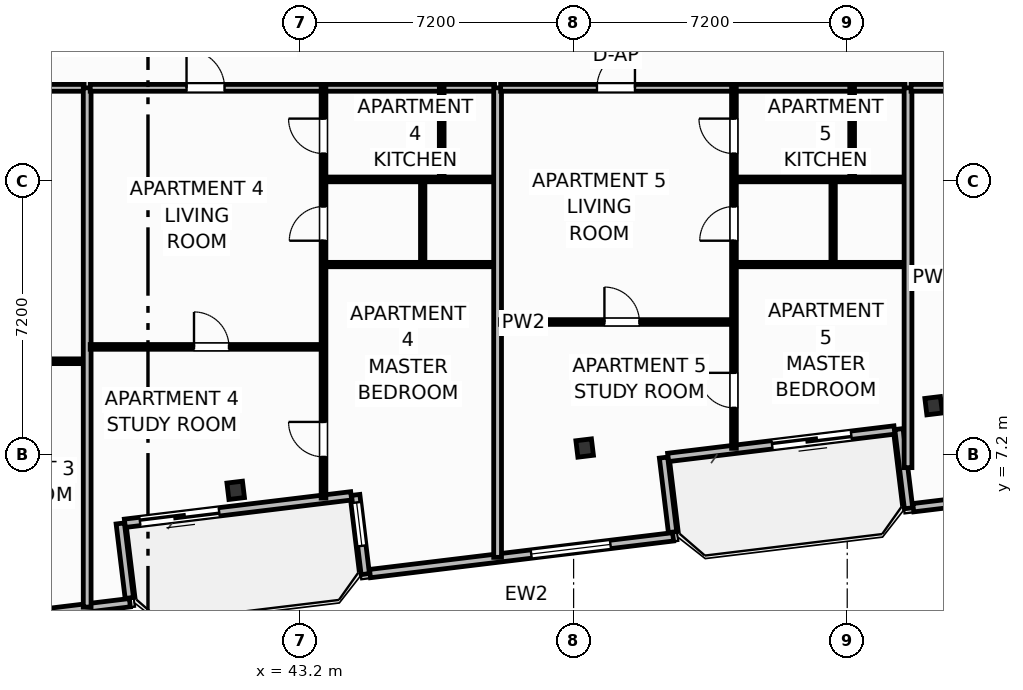
"""IFC4 building model, lengths in metres.
Left out: names, types, materials, properties, quantities, classifications, styles, units other than length and angle.
Written with IfcOpenShell. Run it as: python <this file> out.ifc"""

import sys

from ifc_helpers import new_model, si_unit, direction, frame, frame_2d, origin, origin_2d, place, context, subcontext, project, spatial, rectangle, i_section, extrude, element, fill, save


model = new_model("IFC4")
c1 = context("Model", 3, precision=1e-05, world=origin(), true_north=direction((0.0, 1.0)))
c2 = subcontext(c1, "Body", "Model", "MODEL_VIEW")
j1 = project(units=[si_unit("LENGTHUNIT", "METRE"), si_unit("PLANEANGLEUNIT", "RADIAN")], contexts=[c1])
p1 = place(None, origin())
s1 = spatial("IfcSite", under=j1, at=p1, CompositionType="ELEMENT")
p2 = place(p1, origin())
s2 = spatial("IfcBuilding", under=s1, at=p2, CompositionType="ELEMENT")
p3 = place(p2, frame((0.0, 0.0, 174.6)))
s3 = spatial("IfcBuildingStorey", under=s2, at=p3, CompositionType="ELEMENT", Elevation=174.6)
for number, where, z_axis, x_axis in (
    (1, (41.508, 6.26, 0.0), (0.0, 0.0, 1.0), (0.993, 0.12, 0.0)),
    (2, (50.691, 7.373, 0.0), (0.0, 0.0, 1.0), (0.993, 0.12, 0.0)),
    (3, (59.874, 8.486, 0.0), (0.0, 0.0, 1.0), (0.993, 0.12, 0.0)),
):
    element("IfcColumn", number, at=place(p3, frame(where, z_axis=z_axis, x_axis=x_axis)), inside=s3, PredefinedType="COLUMN", context=c2, shape_type="SweptSolid", body=[
        extrude(i_section(OverallWidth=0.412, OverallDepth=0.435, WebThickness=0.036, FlangeThickness=0.057, FilletRadius=0.025, at=origin_2d()), origin(), (0.0, 0.0, 1.0), 3.7),
    ])
p4 = place(p3, frame((44.548, 6.114, 0.0), z_axis=(0.0, 0.0, 1.0), x_axis=(-0.992735402148, -0.120318000826, 0.0)))
e4 = element("IfcWall", 4, at=p4, inside=s3, PredefinedType="SOLIDWALL", context=c2, shape_type="SweptSolid", body=[
    extrude(rectangle(XDim=6.0, YDim=0.22, at=frame_2d((3.0, 0.0))), origin(), (0.0, 0.0, 1.0), 2.73),
])
p5 = place(p4, frame((3.5, 0.0, 0.0)))
e5 = element("IfcOpeningElement", 5, at=p5, cuts=e4, PredefinedType="OPENING", context=c2, shape_type="SweptSolid", body=[
    extrude(rectangle(XDim=2.1, YDim=2.3, at=frame_2d((1.05, 1.15))), frame((0.0, 0.12, 0.0), z_axis=(0.0, -1.0, 0.0), x_axis=(1.0, 0.0, 0.0)), (0.0, 0.0, 1.0), 0.24),
])
p6 = place(p3, frame((58.843, 7.847, 0.0), z_axis=(0.0, 0.0, 1.0), x_axis=(-0.992729951822, -0.120362962556, 0.0)))
e6 = element("IfcWall", 6, at=p6, inside=s3, PredefinedType="SOLIDWALL", context=c2, shape_type="SweptSolid", body=[
    extrude(rectangle(XDim=6.0, YDim=0.22, at=frame_2d((3.0, 0.0))), origin(), (0.0, 0.0, 1.0), 2.73),
])
p7 = place(p6, frame((1.144, 0.0, 0.0)))
e7 = element("IfcOpeningElement", 7, at=p7, cuts=e6, PredefinedType="OPENING", context=c2, shape_type="SweptSolid", body=[
    extrude(rectangle(XDim=2.1, YDim=2.3, at=frame_2d((1.05, 1.15))), frame((0.0, 0.12, 0.0), z_axis=(0.0, -1.0, 0.0), x_axis=(1.0, 0.0, 0.0)), (0.0, 0.0, 1.0), 0.24),
])
p8 = place(p3, frame((30.747, 2.336, 0.0), z_axis=(0.0, 0.0, 1.0), x_axis=(0.992731032022, 0.120354052946, 0.0)))
e8 = element("IfcWall", 8, at=p8, inside=s3, PredefinedType="SOLIDWALL", context=c2, shape_type="SweptSolid", body=[
    extrude(rectangle(XDim=8.035, YDim=0.22, at=frame_2d((4.018, 0.0))), origin(), (0.0, 0.0, 1.0), 2.73),
])
p9 = place(p8, frame((2.968, 0.0, 0.8)))
e9 = element("IfcOpeningElement", 9, at=p9, cuts=e8, PredefinedType="OPENING", context=c2, shape_type="SweptSolid", body=[
    extrude(rectangle(XDim=2.1, YDim=1.75, at=frame_2d((1.05, 0.875))), frame((0.0, 0.12, 0.0), z_axis=(0.0, -1.0, 0.0), x_axis=(1.0, 0.0, 0.0)), (0.0, 0.0, 1.0), 0.24),
])
p10 = place(p3, frame((38.709, 3.427, 0.0), z_axis=(0.0, 0.0, 1.0), x_axis=(-0.120397815541, 0.992725725472, 0.0)))
e10 = element("IfcWall", 10, at=p10, inside=s3, PredefinedType="SOLIDWALL", context=c2, shape_type="SweptSolid", body=[
    extrude(rectangle(XDim=1.975, YDim=0.22, at=frame_2d((0.988, 0.0))), origin(), (0.0, 0.0, 1.0), 2.73),
])
p11 = place(p3, frame((44.666, 6.138, 0.0), z_axis=(0.0, 0.0, 1.0), x_axis=(0.120327895535, -0.992734202874, 0.0)))
e11 = element("IfcWall", 11, at=p11, inside=s3, PredefinedType="SOLIDWALL", context=c2, shape_type="SweptSolid", body=[
    extrude(rectangle(XDim=2.1, YDim=0.22, at=frame_2d((1.05, 0.0))), origin(), (0.0, 0.0, 1.0), 2.73),
])
p12 = place(p11, frame((0.2, 0.0, 0.8)))
e12 = element("IfcOpeningElement", 12, at=p12, cuts=e11, PredefinedType="OPENING", context=c2, shape_type="SweptSolid", body=[
    extrude(rectangle(XDim=1.15, YDim=1.4, at=frame_2d((0.575, 0.7))), frame((0.0, 0.12, 0.0), z_axis=(0.0, -1.0, 0.0), x_axis=(1.0, 0.0, 0.0)), (0.0, 0.0, 1.0), 0.24),
])
p13 = place(p3, frame((45.042, 4.069, 0.0), z_axis=(0.0, 0.0, 1.0), x_axis=(0.992731032022, 0.120354052946, 0.0)))
e13 = element("IfcWall", 13, at=p13, inside=s3, PredefinedType="SOLIDWALL", context=c2, shape_type="SweptSolid", body=[
    extrude(rectangle(XDim=8.035, YDim=0.22, at=frame_2d((4.018, 0.0))), origin(), (0.0, 0.0, 1.0), 2.73),
])
p14 = place(p13, frame((4.273, 0.0, 0.8)))
e14 = element("IfcOpeningElement", 14, at=p14, cuts=e13, PredefinedType="OPENING", context=c2, shape_type="SweptSolid", body=[
    extrude(rectangle(XDim=2.1, YDim=1.75, at=frame_2d((1.05, 0.875))), frame((0.0, 0.12, 0.0), z_axis=(0.0, -1.0, 0.0), x_axis=(1.0, 0.0, 0.0)), (0.0, 0.0, 1.0), 0.24),
])
p15 = place(p3, frame((53.004, 5.16, 0.0), z_axis=(0.0, 0.0, 1.0), x_axis=(-0.120397815541, 0.992725725472, 0.0)))
e15 = element("IfcWall", 15, at=p15, inside=s3, PredefinedType="SOLIDWALL", context=c2, shape_type="SweptSolid", body=[
    extrude(rectangle(XDim=1.975, YDim=0.22, at=frame_2d((0.988, 0.0))), origin(), (0.0, 0.0, 1.0), 2.73),
])
p16 = place(p3, frame((58.961, 7.872, 0.0), z_axis=(0.0, 0.0, 1.0), x_axis=(0.120327895535, -0.992734202874, 0.0)))
e16 = element("IfcWall", 16, at=p16, inside=s3, PredefinedType="SOLIDWALL", context=c2, shape_type="SweptSolid", body=[
    extrude(rectangle(XDim=2.1, YDim=0.22, at=frame_2d((1.05, 0.0))), origin(), (0.0, 0.0, 1.0), 2.73),
])
p17 = place(p3, frame((59.338, 5.802, 0.0), z_axis=(0.0, 0.0, 1.0), x_axis=(0.992731225757, 0.120352454927, 0.0)))
e17 = element("IfcWall", 17, at=p17, inside=s3, PredefinedType="SOLIDWALL", context=c2, shape_type="SweptSolid", body=[
    extrude(rectangle(XDim=12.447, YDim=0.22, at=frame_2d((6.224, 0.0))), origin(), (0.0, 0.0, 1.0), 2.73),
])
p18 = place(p17, frame((5.174, 0.0, 0.8)))
e18 = element("IfcOpeningElement", 18, at=p18, cuts=e17, PredefinedType="OPENING", context=c2, shape_type="SweptSolid", body=[
    extrude(rectangle(XDim=2.1, YDim=1.75, at=frame_2d((1.05, 0.875))), frame((0.0, 0.12, 0.0), z_axis=(0.0, -1.0, 0.0), x_axis=(1.0, 0.0, 0.0)), (0.0, 0.0, 1.0), 0.24),
])
p19 = place(p3, frame((31.451, 9.656, 0.0), z_axis=(0.0, 0.0, 1.0), x_axis=(1.0, 0.0, 0.0)))
e19 = element("IfcWall", 19, at=p19, inside=s3, PredefinedType="PARTITIONING", context=c2, shape_type="SweptSolid", body=[
    extrude(rectangle(XDim=6.069, YDim=0.125, at=frame_2d((3.035, 0.0))), origin(), (0.0, 0.0, 1.0), 3.45),
])
p20 = place(p19, frame((2.731, 0.0, 0.0)))
e20 = element("IfcOpeningElement", 20, at=p20, cuts=e19, PredefinedType="OPENING", context=c2, shape_type="SweptSolid", body=[
    extrude(rectangle(XDim=0.92, YDim=2.05, at=frame_2d((0.46, 1.025))), frame((0.0, 0.073, 0.0), z_axis=(0.0, -1.0, 0.0), x_axis=(1.0, 0.0, 0.0)), (0.0, 0.0, 1.0), 0.145),
])
p21 = place(p3, frame((26.88, 16.85, 0.0), z_axis=(0.0, 0.0, 1.0), x_axis=(1.0, 0.0, 0.0)))
e21 = element("IfcWall", 21, at=p21, inside=s3, PredefinedType="PARTITIONING", context=c2, shape_type="SweptSolid", body=[
    extrude(rectangle(XDim=10.64, YDim=0.18, at=frame_2d((5.32, 0.0))), origin(), (0.0, 0.0, 1.0), 3.45),
])
p22 = place(p21, frame((7.105, 0.0, 0.0)))
e22 = element("IfcOpeningElement", 22, at=p22, cuts=e21, PredefinedType="OPENING", context=c2, shape_type="SweptSolid", body=[
    extrude(rectangle(XDim=1.0, YDim=2.2, at=frame_2d((0.5, 1.1))), frame((0.0, 0.1, 0.0), z_axis=(0.0, -1.0, 0.0), x_axis=(1.0, 0.0, 0.0)), (0.0, 0.0, 1.0), 0.2),
])
p23 = place(p3, frame((37.6, 3.187, 0.0), z_axis=(0.0, 0.0, 1.0), x_axis=(0.0, 1.0, 0.0)))
e23 = element("IfcWall", 23, at=p23, inside=s3, PredefinedType="PARTITIONING", context=c2, shape_type="SweptSolid", body=[
    extrude(rectangle(XDim=13.663, YDim=0.205, at=frame_2d((6.832, 0.0))), origin(), (0.0, 0.0, 1.0), 3.45),
])
p24 = place(p3, frame((37.68, 10.033, 0.0), z_axis=(0.0, 0.0, 1.0), x_axis=(1.0, 0.0, 0.0)))
e24 = element("IfcWall", 24, at=p24, inside=s3, PredefinedType="PARTITIONING", context=c2, shape_type="SweptSolid", body=[
    extrude(rectangle(XDim=6.069, YDim=0.125, at=frame_2d((3.035, 0.0))), origin(), (0.0, 0.0, 1.0), 3.45),
])
p25 = place(p24, frame((2.731, 0.0, 0.0)))
e25 = element("IfcOpeningElement", 25, at=p25, cuts=e24, PredefinedType="OPENING", context=c2, shape_type="SweptSolid", body=[
    extrude(rectangle(XDim=0.92, YDim=2.05, at=frame_2d((0.46, 1.025))), frame((0.0, 0.073, 0.0), z_axis=(0.0, -1.0, 0.0), x_axis=(1.0, 0.0, 0.0)), (0.0, 0.0, 1.0), 0.145),
])
p26 = place(p3, frame((37.68, 16.85, 0.0), z_axis=(0.0, 0.0, 1.0), x_axis=(1.0, 0.0, 0.0)))
e26 = element("IfcWall", 26, at=p26, inside=s3, PredefinedType="PARTITIONING", context=c2, shape_type="SweptSolid", body=[
    extrude(rectangle(XDim=10.64, YDim=0.18, at=frame_2d((5.32, 0.0))), origin(), (0.0, 0.0, 1.0), 3.45),
])
p27 = place(p26, frame((2.535, 0.0, 0.0)))
e27 = element("IfcOpeningElement", 27, at=p27, cuts=e26, PredefinedType="OPENING", context=c2, shape_type="SweptSolid", body=[
    extrude(rectangle(XDim=1.0, YDim=2.2, at=frame_2d((0.5, 1.1))), frame((0.0, 0.1, 0.0), z_axis=(0.0, -1.0, 0.0), x_axis=(1.0, 0.0, 0.0)), (0.0, 0.0, 1.0), 0.2),
])
p28 = place(p3, frame((43.819, 6.056, 0.0), z_axis=(0.0, 0.0, 1.0), x_axis=(0.0, 1.0, 0.0)))
e28 = element("IfcWall", 28, at=p28, inside=s3, PredefinedType="PARTITIONING", context=c2, shape_type="SweptSolid", body=[
    extrude(rectangle(XDim=10.794, YDim=0.125, at=frame_2d((5.397, 0.0))), origin(), (0.0, 0.0, 1.0), 2.662),
])
p29 = place(p28, frame((1.083, 0.0, 0.0)))
e29 = element("IfcOpeningElement", 29, at=p29, cuts=e28, PredefinedType="OPENING", context=c2, shape_type="SweptSolid", body=[
    extrude(rectangle(XDim=0.92, YDim=2.05, at=frame_2d((0.46, 1.025))), frame((0.0, 0.073, 0.0), z_axis=(0.0, -1.0, 0.0), x_axis=(1.0, 0.0, 0.0)), (0.0, 0.0, 1.0), 0.145),
])
p30 = place(p28, frame((6.771, 0.0, 0.0)))
e30 = element("IfcOpeningElement", 30, at=p30, cuts=e28, PredefinedType="OPENING", context=c2, shape_type="SweptSolid", body=[
    extrude(rectangle(XDim=0.9, YDim=2.05, at=frame_2d((0.45, 1.025))), frame((0.0, 0.073, 0.0), z_axis=(0.0, -1.0, 0.0), x_axis=(1.0, 0.0, 0.0)), (0.0, 0.0, 1.0), 0.145),
])
p31 = place(p28, frame((9.064, 0.0, 0.0)))
e31 = element("IfcOpeningElement", 31, at=p31, cuts=e28, PredefinedType="OPENING", context=c2, shape_type="SweptSolid", body=[
    extrude(rectangle(XDim=0.92, YDim=2.05, at=frame_2d((0.46, 1.025))), frame((0.0, 0.073, 0.0), z_axis=(0.0, -1.0, 0.0), x_axis=(1.0, 0.0, 0.0)), (0.0, 0.0, 1.0), 0.145),
])
p32 = place(p3, frame((43.889, 14.44, 0.0), z_axis=(0.0, 0.0, 1.0), x_axis=(1.0, 0.0, 0.0)))
e32 = element("IfcWall", 32, at=p32, inside=s3, PredefinedType="PARTITIONING", context=c2, shape_type="SweptSolid", body=[
    extrude(rectangle(XDim=4.431, YDim=0.125, at=frame_2d((2.215, 0.0))), origin(), (0.0, 0.0, 1.0), 3.45),
])
p33 = place(p3, frame((43.889, 12.2, 0.0), z_axis=(0.0, 0.0, 1.0), x_axis=(1.0, 0.0, 0.0)))
e33 = element("IfcWall", 33, at=p33, inside=s3, PredefinedType="PARTITIONING", context=c2, shape_type="SweptSolid", body=[
    extrude(rectangle(XDim=4.431, YDim=0.115, at=frame_2d((2.215, 0.0))), origin(), (0.0, 0.0, 1.0), 3.45),
])
p34 = place(p3, frame((46.929, 14.44, 0.0), z_axis=(0.0, 0.0, 1.0), x_axis=(0.0, 1.0, 0.0)))
e34 = element("IfcWall", 34, at=p34, inside=s3, PredefinedType="PARTITIONING", context=c2, shape_type="SweptSolid", body=[
    extrude(rectangle(XDim=2.41, YDim=0.125, at=frame_2d((1.205, 0.0))), origin(), (0.0, 0.0, 1.0), 3.45),
])
p35 = place(p3, frame((46.429, 12.2, 0.0), z_axis=(0.0, 0.0, 1.0), x_axis=(0.0, 1.0, 0.0)))
e35 = element("IfcWall", 35, at=p35, inside=s3, PredefinedType="PARTITIONING", context=c2, shape_type="SweptSolid", body=[
    extrude(rectangle(XDim=2.24, YDim=0.115, at=frame_2d((1.12, 0.0))), origin(), (0.0, 0.0, 1.0), 3.45),
])
p36 = place(p3, frame((48.4, 4.496, 0.0), z_axis=(0.0, 0.0, 1.0), x_axis=(0.0, 1.0, 0.0)))
e36 = element("IfcWall", 36, at=p36, inside=s3, PredefinedType="PARTITIONING", context=c2, shape_type="SweptSolid", body=[
    extrude(rectangle(XDim=12.354, YDim=0.205, at=frame_2d((6.177, 0.0))), origin(), (0.0, 0.0, 1.0), 3.45),
])
p37 = place(p3, frame((48.48, 10.688, 0.0), z_axis=(0.0, 0.0, 1.0), x_axis=(1.0, 0.0, 0.0)))
e37 = element("IfcWall", 37, at=p37, inside=s3, PredefinedType="PARTITIONING", context=c2, shape_type="SweptSolid", body=[
    extrude(rectangle(XDim=6.069, YDim=0.125, at=frame_2d((3.035, 0.0))), origin(), (0.0, 0.0, 1.0), 3.45),
])
p38 = place(p37, frame((2.731, 0.0, 0.0)))
e38 = element("IfcOpeningElement", 38, at=p38, cuts=e37, PredefinedType="OPENING", context=c2, shape_type="SweptSolid", body=[
    extrude(rectangle(XDim=0.92, YDim=2.05, at=frame_2d((0.46, 1.025))), frame((0.0, 0.073, 0.0), z_axis=(0.0, -1.0, 0.0), x_axis=(1.0, 0.0, 0.0)), (0.0, 0.0, 1.0), 0.145),
])
p39 = place(p3, frame((48.48, 16.85, 0.0), z_axis=(0.0, 0.0, 1.0), x_axis=(1.0, 0.0, 0.0)))
e39 = element("IfcWall", 39, at=p39, inside=s3, PredefinedType="PARTITIONING", context=c2, shape_type="SweptSolid", body=[
    extrude(rectangle(XDim=10.64, YDim=0.18, at=frame_2d((5.32, 0.0))), origin(), (0.0, 0.0, 1.0), 3.45),
])
p40 = place(p39, frame((2.535, 0.0, 0.0)))
e40 = element("IfcOpeningElement", 40, at=p40, cuts=e39, PredefinedType="OPENING", context=c2, shape_type="SweptSolid", body=[
    extrude(rectangle(XDim=1.0, YDim=2.2, at=frame_2d((0.5, 1.1))), frame((0.0, 0.1, 0.0), z_axis=(0.0, -1.0, 0.0), x_axis=(1.0, 0.0, 0.0)), (0.0, 0.0, 1.0), 0.2),
])
p41 = place(p3, frame((54.619, 7.365, 0.0), z_axis=(0.0, 0.0, 1.0), x_axis=(0.0, 1.0, 0.0)))
e41 = element("IfcWall", 41, at=p41, inside=s3, PredefinedType="PARTITIONING", context=c2, shape_type="SweptSolid", body=[
    extrude(rectangle(XDim=9.485, YDim=0.125, at=frame_2d((4.742, 0.0))), origin(), (0.0, 0.0, 1.0), 3.45),
])
p42 = place(p41, frame((1.065, 0.0, 0.0)))
e42 = element("IfcOpeningElement", 42, at=p42, cuts=e41, PredefinedType="OPENING", context=c2, shape_type="SweptSolid", body=[
    extrude(rectangle(XDim=0.92, YDim=2.05, at=frame_2d((0.46, 1.025))), frame((0.0, 0.073, 0.0), z_axis=(0.0, -1.0, 0.0), x_axis=(1.0, 0.0, 0.0)), (0.0, 0.0, 1.0), 0.145),
])
p43 = place(p41, frame((5.462, 0.0, 0.0)))
e43 = element("IfcOpeningElement", 43, at=p43, cuts=e41, PredefinedType="OPENING", context=c2, shape_type="SweptSolid", body=[
    extrude(rectangle(XDim=0.9, YDim=2.05, at=frame_2d((0.45, 1.025))), frame((0.0, 0.073, 0.0), z_axis=(0.0, -1.0, 0.0), x_axis=(1.0, 0.0, 0.0)), (0.0, 0.0, 1.0), 0.145),
])
p44 = place(p41, frame((7.755, 0.0, 0.0)))
e44 = element("IfcOpeningElement", 44, at=p44, cuts=e41, PredefinedType="OPENING", context=c2, shape_type="SweptSolid", body=[
    extrude(rectangle(XDim=0.92, YDim=2.05, at=frame_2d((0.46, 1.025))), frame((0.0, 0.073, 0.0), z_axis=(0.0, -1.0, 0.0), x_axis=(1.0, 0.0, 0.0)), (0.0, 0.0, 1.0), 0.145),
])
p45 = place(p3, frame((54.689, 14.44, 0.0), z_axis=(0.0, 0.0, 1.0), x_axis=(1.0, 0.0, 0.0)))
e45 = element("IfcWall", 45, at=p45, inside=s3, PredefinedType="PARTITIONING", context=c2, shape_type="SweptSolid", body=[
    extrude(rectangle(XDim=4.431, YDim=0.125, at=frame_2d((2.215, 0.0))), origin(), (0.0, 0.0, 1.0), 3.45),
])
p46 = place(p3, frame((54.689, 12.2, 0.0), z_axis=(0.0, 0.0, 1.0), x_axis=(1.0, 0.0, 0.0)))
e46 = element("IfcWall", 46, at=p46, inside=s3, PredefinedType="PARTITIONING", context=c2, shape_type="SweptSolid", body=[
    extrude(rectangle(XDim=4.431, YDim=0.115, at=frame_2d((2.215, 0.0))), origin(), (0.0, 0.0, 1.0), 3.018),
])
p47 = place(p3, frame((57.729, 14.44, 0.0), z_axis=(0.0, 0.0, 1.0), x_axis=(0.0, 1.0, 0.0)))
e47 = element("IfcWall", 47, at=p47, inside=s3, PredefinedType="PARTITIONING", context=c2, shape_type="SweptSolid", body=[
    extrude(rectangle(XDim=2.41, YDim=0.125, at=frame_2d((1.205, 0.0))), origin(), (0.0, 0.0, 1.0), 3.45),
])
p48 = place(p3, frame((57.229, 12.2, 0.0), z_axis=(0.0, 0.0, 1.0), x_axis=(0.0, 1.0, 0.0)))
e48 = element("IfcWall", 48, at=p48, inside=s3, PredefinedType="PARTITIONING", context=c2, shape_type="SweptSolid", body=[
    extrude(rectangle(XDim=2.24, YDim=0.115, at=frame_2d((1.12, 0.0))), origin(), (0.0, 0.0, 1.0), 3.45),
])
p49 = place(p3, frame((59.2, 6.856, 0.0), z_axis=(0.0, 0.0, 1.0), x_axis=(0.0, 1.0, 0.0)))
e49 = element("IfcWall", 49, at=p49, inside=s3, PredefinedType="PARTITIONING", context=c2, shape_type="SweptSolid", body=[
    extrude(rectangle(XDim=9.994, YDim=0.205, at=frame_2d((4.997, 0.0))), origin(), (0.0, 0.0, 1.0), 3.45),
])
p50 = place(p3, frame((59.28, 16.85, 0.0), z_axis=(0.0, 0.0, 1.0), x_axis=(1.0, 0.0, 0.0)))
e50 = element("IfcWall", 50, at=p50, inside=s3, PredefinedType="PARTITIONING", context=c2, shape_type="SweptSolid", body=[
    extrude(rectangle(XDim=16.322, YDim=0.18, at=frame_2d((8.161, 0.0))), origin(), (0.0, 0.0, 1.0), 3.45),
])
p51 = place(p50, frame((0.916, 0.0, 0.0)))
e51 = element("IfcOpeningElement", 51, at=p51, cuts=e50, PredefinedType="OPENING", context=c2, shape_type="SweptSolid", body=[
    extrude(rectangle(XDim=0.95, YDim=2.15, at=frame_2d((0.475, 1.075))), frame((0.0, 0.1, 0.0), z_axis=(0.0, -1.0, 0.0), x_axis=(1.0, 0.0, 0.0)), (0.0, 0.0, 1.0), 0.2),
])
p52 = place(p5, origin())
e52 = element("IfcDoor", 52, at=p52, inside=s3, OperationType="SLIDING_TO_LEFT", PredefinedType="DOOR", context=c2, shape_type="SweptSolid", body=[
    extrude(rectangle(XDim=2.1, YDim=2.3, at=frame_2d((1.05, 1.15))), frame((0.0, 0.025, 0.0), z_axis=(0.0, -1.0, 0.0), x_axis=(1.0, 0.0, 0.0)), (0.0, 0.0, 1.0), 0.05),
])
fill(e5, e52)
p53 = place(p7, origin())
e53 = element("IfcDoor", 53, at=p53, inside=s3, OperationType="SLIDING_TO_LEFT", PredefinedType="DOOR", context=c2, shape_type="SweptSolid", body=[
    extrude(rectangle(XDim=2.1, YDim=2.3, at=frame_2d((1.05, 1.15))), frame((0.0, 0.025, 0.0), z_axis=(0.0, -1.0, 0.0), x_axis=(1.0, 0.0, 0.0)), (0.0, 0.0, 1.0), 0.05),
])
fill(e7, e53)
p54 = place(p14, origin())
e54 = element("IfcWindow", 54, at=p54, inside=s3, PartitioningType="SINGLE_PANEL", PredefinedType="WINDOW", context=c2, shape_type="SweptSolid", body=[
    extrude(rectangle(XDim=2.1, YDim=1.75, at=frame_2d((1.05, 0.875))), frame((0.0, 0.03, 0.0), z_axis=(0.0, -1.0, 0.0), x_axis=(1.0, 0.0, 0.0)), (0.0, 0.0, 1.0), 0.06),
])
fill(e14, e54)
p55 = place(p25, origin())
e55 = element("IfcDoor", 55, at=p55, inside=s3, OperationType="SINGLE_SWING_LEFT", PredefinedType="DOOR", context=c2, shape_type="SweptSolid", body=[
    extrude(rectangle(XDim=0.92, YDim=2.05, at=frame_2d((0.46, 1.025))), frame((0.0, 0.025, 0.0), z_axis=(0.0, -1.0, 0.0), x_axis=(1.0, 0.0, 0.0)), (0.0, 0.0, 1.0), 0.05),
])
fill(e25, e55)
p56 = place(p27, origin())
e56 = element("IfcDoor", 56, at=p56, inside=s3, OperationType="SINGLE_SWING_LEFT", PredefinedType="DOOR", context=c2, shape_type="SweptSolid", body=[
    extrude(rectangle(XDim=1.0, YDim=2.2, at=frame_2d((0.5, 1.1))), frame((0.0, 0.025, 0.0), z_axis=(0.0, -1.0, 0.0), x_axis=(1.0, 0.0, 0.0)), (0.0, 0.0, 1.0), 0.05),
])
fill(e27, e56)
p57 = place(p29, origin())
e57 = element("IfcDoor", 57, at=p57, inside=s3, OperationType="SINGLE_SWING_RIGHT", PredefinedType="DOOR", context=c2, shape_type="SweptSolid", body=[
    extrude(rectangle(XDim=0.92, YDim=2.05, at=frame_2d((0.46, 1.025))), frame((0.0, 0.025, 0.0), z_axis=(0.0, -1.0, 0.0), x_axis=(1.0, 0.0, 0.0)), (0.0, 0.0, 1.0), 0.05),
])
fill(e29, e57)
p58 = place(p30, origin())
e58 = element("IfcDoor", 58, at=p58, inside=s3, OperationType="SINGLE_SWING_LEFT", PredefinedType="DOOR", context=c2, shape_type="SweptSolid", body=[
    extrude(rectangle(XDim=0.9, YDim=2.05, at=frame_2d((0.45, 1.025))), frame((0.0, 0.025, 0.0), z_axis=(0.0, -1.0, 0.0), x_axis=(1.0, 0.0, 0.0)), (0.0, 0.0, 1.0), 0.05),
])
fill(e30, e58)
p59 = place(p31, origin())
e59 = element("IfcDoor", 59, at=p59, inside=s3, OperationType="SINGLE_SWING_RIGHT", PredefinedType="DOOR", context=c2, shape_type="SweptSolid", body=[
    extrude(rectangle(XDim=0.92, YDim=2.05, at=frame_2d((0.46, 1.025))), frame((0.0, 0.025, 0.0), z_axis=(0.0, -1.0, 0.0), x_axis=(1.0, 0.0, 0.0)), (0.0, 0.0, 1.0), 0.05),
])
fill(e31, e59)
p60 = place(p38, origin())
e60 = element("IfcDoor", 60, at=p60, inside=s3, OperationType="SINGLE_SWING_LEFT", PredefinedType="DOOR", context=c2, shape_type="SweptSolid", body=[
    extrude(rectangle(XDim=0.92, YDim=2.05, at=frame_2d((0.46, 1.025))), frame((0.0, 0.025, 0.0), z_axis=(0.0, -1.0, 0.0), x_axis=(1.0, 0.0, 0.0)), (0.0, 0.0, 1.0), 0.05),
])
fill(e38, e60)
p61 = place(p40, origin())
e61 = element("IfcDoor", 61, at=p61, inside=s3, OperationType="SINGLE_SWING_RIGHT", PredefinedType="DOOR", context=c2, shape_type="SweptSolid", body=[
    extrude(rectangle(XDim=1.0, YDim=2.2, at=frame_2d((0.5, 1.1))), frame((0.0, 0.025, 0.0), z_axis=(0.0, -1.0, 0.0), x_axis=(1.0, 0.0, 0.0)), (0.0, 0.0, 1.0), 0.05),
])
fill(e40, e61)
p62 = place(p42, origin())
e62 = element("IfcDoor", 62, at=p62, inside=s3, OperationType="SINGLE_SWING_RIGHT", PredefinedType="DOOR", context=c2, shape_type="SweptSolid", body=[
    extrude(rectangle(XDim=0.92, YDim=2.05, at=frame_2d((0.46, 1.025))), frame((0.0, 0.025, 0.0), z_axis=(0.0, -1.0, 0.0), x_axis=(1.0, 0.0, 0.0)), (0.0, 0.0, 1.0), 0.05),
])
fill(e42, e62)
p63 = place(p43, origin())
e63 = element("IfcDoor", 63, at=p63, inside=s3, OperationType="SINGLE_SWING_LEFT", PredefinedType="DOOR", context=c2, shape_type="SweptSolid", body=[
    extrude(rectangle(XDim=0.9, YDim=2.05, at=frame_2d((0.45, 1.025))), frame((0.0, 0.025, 0.0), z_axis=(0.0, -1.0, 0.0), x_axis=(1.0, 0.0, 0.0)), (0.0, 0.0, 1.0), 0.05),
])
fill(e43, e63)
p64 = place(p44, origin())
e64 = element("IfcDoor", 64, at=p64, inside=s3, OperationType="SINGLE_SWING_RIGHT", PredefinedType="DOOR", context=c2, shape_type="SweptSolid", body=[
    extrude(rectangle(XDim=0.92, YDim=2.05, at=frame_2d((0.46, 1.025))), frame((0.0, 0.025, 0.0), z_axis=(0.0, -1.0, 0.0), x_axis=(1.0, 0.0, 0.0)), (0.0, 0.0, 1.0), 0.05),
])
fill(e44, e64)
p65 = place(p12, origin())
e65 = element("IfcWindow", 65, at=p65, inside=s3, PartitioningType="SINGLE_PANEL", PredefinedType="WINDOW", context=c2, shape_type="SweptSolid", body=[
    extrude(rectangle(XDim=1.15, YDim=1.4, at=frame_2d((0.575, 0.7))), frame((0.0, 0.03, 0.0), z_axis=(0.0, -1.0, 0.0), x_axis=(1.0, 0.0, 0.0)), (0.0, 0.0, 1.0), 0.06),
])
fill(e12, e65)
save(model, sys.argv[1])
